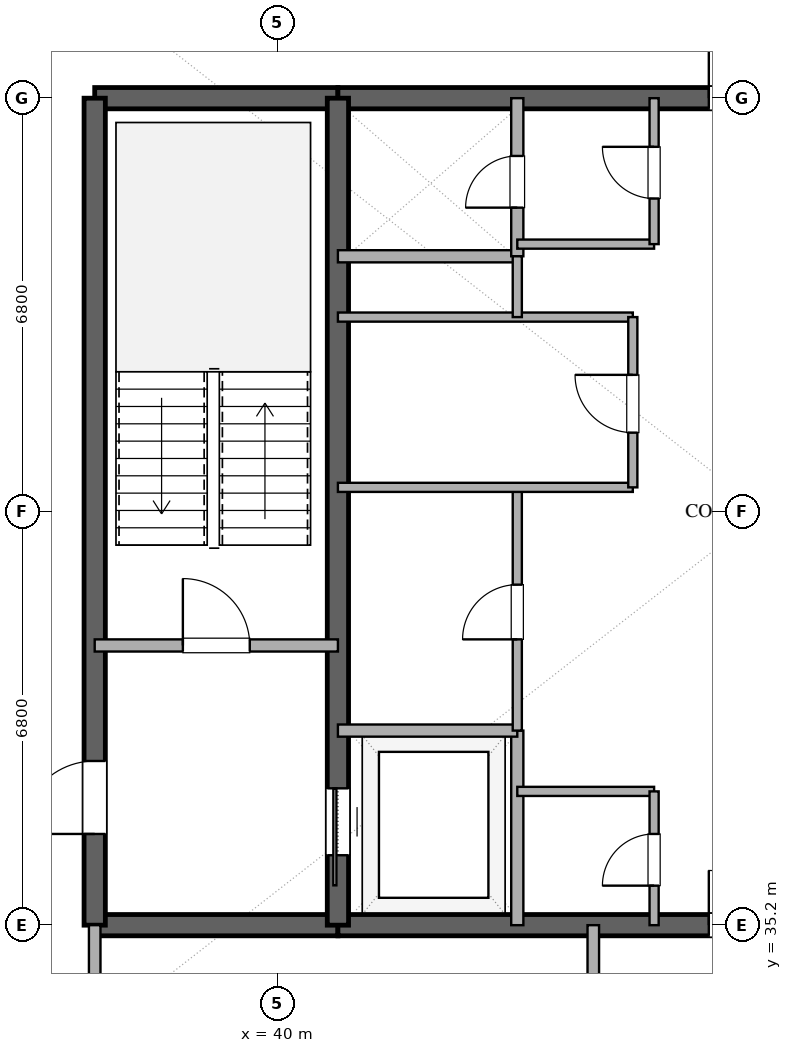
"""IFC4 building model, lengths in metres.
Left out: names, types, materials, properties, quantities, classifications, styles, units other than length and angle.
Written with IfcOpenShell. Run it as: python <this file> out.ifc"""

import sys

from ifc_helpers import new_model, si_unit, direction, frame, frame_2d, origin, place, context, subcontext, project, spatial, rectangle, extrude, element, fill, save


model = new_model("IFC4")
c1 = context("Model", 3, precision=1e-05, world=origin(), true_north=direction((0.0, 1.0)))
c2 = subcontext(c1, "Body", "Model", "MODEL_VIEW")
j1 = project(units=[si_unit("LENGTHUNIT", "METRE"), si_unit("PLANEANGLEUNIT", "RADIAN")], contexts=[c1])
p1 = place(None, origin())
s1 = spatial("IfcSite", under=j1, at=p1, CompositionType="ELEMENT")
p2 = place(p1, origin())
s2 = spatial("IfcBuilding", under=s1, at=p2, CompositionType="ELEMENT")
p3 = place(p2, frame((0.0, 0.0, 312.6)))
s3 = spatial("IfcBuildingStorey", under=s2, at=p3, CompositionType="ELEMENT", Elevation=312.6)
p4 = place(p3, frame((37.0, 35.2, 0.0), z_axis=(0.0, 0.0, 1.0), x_axis=(1.0, 0.0, 0.0)))
e1 = element("IfcWall", 1, at=p4, inside=s3, PredefinedType="SHEAR", context=c2, shape_type="SweptSolid", body=[
    extrude(rectangle(XDim=4.0, YDim=0.35, at=frame_2d((2.0, 0.0))), origin(), (0.0, 0.0, 1.0), 3.64),
])
p5 = place(p3, frame((41.0, 35.2, 0.0), z_axis=(0.0, 0.0, 1.0), x_axis=(1.0, 0.0, 0.0)))
e2 = element("IfcWall", 2, at=p5, inside=s3, PredefinedType="SHEAR", context=c2, shape_type="SweptSolid", body=[
    extrude(rectangle(XDim=14.0, YDim=0.35, at=frame_2d((7.0, 0.0))), origin(), (0.0, 0.0, 1.0), 3.64),
])
p6 = place(p5, frame((6.1, 0.0, 0.0)))
e3 = element("IfcOpeningElement", 3, at=p6, cuts=e2, PredefinedType="OPENING", context=c2, shape_type="SweptSolid", body=[
    extrude(rectangle(XDim=1.8, YDim=2.25, at=frame_2d((0.9, 1.125))), frame((0.0, 0.185, 0.0), z_axis=(0.0, -1.0, 0.0), x_axis=(1.0, 0.0, 0.0)), (0.0, 0.0, 1.0), 0.37),
])
p7 = place(p3, frame((37.0, 48.8, 0.0), z_axis=(0.0, 0.0, 1.0), x_axis=(1.0, 0.0, 0.0)))
e4 = element("IfcWall", 4, at=p7, inside=s3, PredefinedType="SHEAR", context=c2, shape_type="SweptSolid", body=[
    extrude(rectangle(XDim=4.0, YDim=0.35, at=frame_2d((2.0, 0.0))), origin(), (0.0, 0.0, 1.0), 3.64),
])
p8 = place(p3, frame((41.0, 48.8, 0.0), z_axis=(0.0, 0.0, 1.0), x_axis=(1.0, 0.0, 0.0)))
e5 = element("IfcWall", 5, at=p8, inside=s3, PredefinedType="SHEAR", context=c2, shape_type="SweptSolid", body=[
    extrude(rectangle(XDim=14.0, YDim=0.35, at=frame_2d((7.0, 0.0))), origin(), (0.0, 0.0, 1.0), 3.64),
])
p9 = place(p8, frame((6.1, 0.0, 0.0)))
e6 = element("IfcOpeningElement", 6, at=p9, cuts=e5, PredefinedType="OPENING", context=c2, shape_type="SweptSolid", body=[
    extrude(rectangle(XDim=1.8, YDim=2.25, at=frame_2d((0.9, 1.125))), frame((0.0, 0.185, 0.0), z_axis=(0.0, -1.0, 0.0), x_axis=(1.0, 0.0, 0.0)), (0.0, 0.0, 1.0), 0.37),
])
p10 = place(p3, frame((37.0, 35.2, 0.0), z_axis=(0.0, 0.0, 1.0), x_axis=(0.0, 1.0, 0.0)))
e7 = element("IfcWall", 7, at=p10, inside=s3, PredefinedType="SHEAR", context=c2, shape_type="SweptSolid", body=[
    extrude(rectangle(XDim=13.6, YDim=0.35, at=frame_2d((6.8, 0.0))), origin(), (0.0, 0.0, 1.0), 3.64),
])
p11 = place(p10, frame((1.5, 0.0, 0.0)))
e8 = element("IfcOpeningElement", 8, at=p11, cuts=e7, PredefinedType="OPENING", context=c2, shape_type="SweptSolid", body=[
    extrude(rectangle(XDim=1.2, YDim=2.15, at=frame_2d((0.6, 1.075))), frame((0.0, 0.185, 0.0), z_axis=(0.0, -1.0, 0.0), x_axis=(1.0, 0.0, 0.0)), (0.0, 0.0, 1.0), 0.37),
])
p12 = place(p3, frame((41.0, 35.2, 0.0), z_axis=(0.0, 0.0, 1.0), x_axis=(0.0, 1.0, 0.0)))
e9 = element("IfcWall", 9, at=p12, inside=s3, PredefinedType="SHEAR", context=c2, shape_type="SweptSolid", body=[
    extrude(rectangle(XDim=13.6, YDim=0.35, at=frame_2d((6.8, 0.0))), origin(), (0.0, 0.0, 1.0), 3.64),
])
p13 = place(p12, frame((1.15, 0.0, 0.0)))
e10 = element("IfcOpeningElement", 10, at=p13, cuts=e9, PredefinedType="OPENING", context=c2, shape_type="SweptSolid", body=[
    extrude(rectangle(XDim=1.1, YDim=2.2, at=frame_2d((0.55, 1.1))), frame((0.0, 0.185, 0.0), z_axis=(0.0, -1.0, 0.0), x_axis=(1.0, 0.0, 0.0)), (0.0, 0.0, 1.0), 0.37),
])
p14 = place(p3, frame((37.0, 39.8, 0.0), z_axis=(0.0, 0.0, 1.0), x_axis=(1.0, 0.0, 0.0)))
e11 = element("IfcWall", 11, at=p14, inside=s3, PredefinedType="SOLIDWALL", context=c2, shape_type="SweptSolid", body=[
    extrude(rectangle(XDim=4.0, YDim=0.2, at=frame_2d((2.0, 0.0))), origin(), (0.0, 0.0, 1.0), 2.34),
])
p15 = place(p14, frame((1.45, 0.0, 0.0)))
e12 = element("IfcOpeningElement", 12, at=p15, cuts=e11, PredefinedType="OPENING", context=c2, shape_type="SweptSolid", body=[
    extrude(rectangle(XDim=1.1, YDim=2.15, at=frame_2d((0.55, 1.075))), frame((0.0, 0.11, 0.0), z_axis=(0.0, -1.0, 0.0), x_axis=(1.0, 0.0, 0.0)), (0.0, 0.0, 1.0), 0.22),
])
p16 = place(p3, frame((43.95, 35.2, 0.0), z_axis=(0.0, 0.0, 1.0), x_axis=(0.0, 1.0, 0.0)))
e13 = element("IfcWall", 13, at=p16, inside=s3, PredefinedType="SOLIDWALL", context=c2, shape_type="SweptSolid", body=[
    extrude(rectangle(XDim=3.2, YDim=0.2, at=frame_2d((1.6, 0.0))), origin(), (0.0, 0.0, 1.0), 2.34),
])
for number, where, z_axis, x_axis in (
    (14, (41.0, 38.4, 0.0), (0.0, 0.0, 1.0), (1.0, 0.0, 0.0)),
    (15, (41.0, 46.2, 0.0), (0.0, 0.0, 1.0), (1.0, 0.0, 0.0)),
):
    element("IfcWall", number, at=place(p3, frame(where, z_axis=z_axis, x_axis=x_axis)), inside=s3, PredefinedType="SOLIDWALL", context=c2, shape_type="SweptSolid", body=[
        extrude(rectangle(XDim=2.95, YDim=0.2, at=frame_2d((1.475, 0.0))), origin(), (0.0, 0.0, 1.0), 2.34),
    ])
p17 = place(p3, frame((43.95, 46.2, 0.0), z_axis=(0.0, 0.0, 1.0), x_axis=(0.0, 1.0, 0.0)))
e16 = element("IfcWall", 16, at=p17, inside=s3, PredefinedType="SOLIDWALL", context=c2, shape_type="SweptSolid", body=[
    extrude(rectangle(XDim=2.6, YDim=0.2, at=frame_2d((1.3, 0.0))), origin(), (0.0, 0.0, 1.0), 2.34),
])
p18 = place(p17, frame((0.8, 0.0, 0.0)))
e17 = element("IfcOpeningElement", 17, at=p18, cuts=e16, PredefinedType="OPENING", context=c2, shape_type="SweptSolid", body=[
    extrude(rectangle(XDim=0.85, YDim=2.15, at=frame_2d((0.425, 1.075))), frame((0.0, 0.11, 0.0), z_axis=(0.0, -1.0, 0.0), x_axis=(1.0, 0.0, 0.0)), (0.0, 0.0, 1.0), 0.22),
])
p19 = place(p3, frame((43.95, 38.4, 0.0), z_axis=(0.0, 0.0, 1.0), x_axis=(0.0, 1.0, 0.0)))
e18 = element("IfcWall", 18, at=p19, inside=s3, PredefinedType="PARTITIONING", context=c2, shape_type="SweptSolid", body=[
    extrude(rectangle(XDim=4.0, YDim=0.15, at=frame_2d((2.0, 0.0))), origin(), (0.0, 0.0, 1.0), 2.34),
])
p20 = place(p19, frame((1.5, 0.0, 0.0)))
e19 = element("IfcOpeningElement", 19, at=p20, cuts=e18, PredefinedType="OPENING", context=c2, shape_type="SweptSolid", body=[
    extrude(rectangle(XDim=0.9, YDim=2.15, at=frame_2d((0.45, 1.075))), frame((0.0, 0.085, 0.0), z_axis=(0.0, -1.0, 0.0), x_axis=(1.0, 0.0, 0.0)), (0.0, 0.0, 1.0), 0.17),
])
p21 = place(p3, frame((41.0, 42.4, 0.0), z_axis=(0.0, 0.0, 1.0), x_axis=(1.0, 0.0, 0.0)))
e20 = element("IfcWall", 20, at=p21, inside=s3, PredefinedType="PARTITIONING", context=c2, shape_type="SweptSolid", body=[
    extrude(rectangle(XDim=4.85, YDim=0.15, at=frame_2d((2.425, 0.0))), origin(), (0.0, 0.0, 1.0), 2.04),
])
p22 = place(p3, frame((41.0, 45.2, 0.0), z_axis=(0.0, 0.0, 1.0), x_axis=(1.0, 0.0, 0.0)))
e21 = element("IfcWall", 21, at=p22, inside=s3, PredefinedType="PARTITIONING", context=c2, shape_type="SweptSolid", body=[
    extrude(rectangle(XDim=4.85, YDim=0.15, at=frame_2d((2.425, 0.0))), origin(), (0.0, 0.0, 1.0), 2.34),
])
p23 = place(p3, frame((43.95, 45.2, 0.0), z_axis=(0.0, 0.0, 1.0), x_axis=(0.0, 1.0, 0.0)))
e22 = element("IfcWall", 22, at=p23, inside=s3, PredefinedType="PARTITIONING", context=c2, shape_type="SweptSolid", body=[
    extrude(rectangle(XDim=1.0, YDim=0.15, at=frame_2d((0.5, 0.0))), origin(), (0.0, 0.0, 1.0), 2.34),
])
p24 = place(p3, frame((45.85, 42.4, 0.0), z_axis=(0.0, 0.0, 1.0), x_axis=(0.0, 1.0, 0.0)))
e23 = element("IfcWall", 23, at=p24, inside=s3, PredefinedType="PARTITIONING", context=c2, shape_type="SweptSolid", body=[
    extrude(rectangle(XDim=2.8, YDim=0.15, at=frame_2d((1.4, 0.0))), origin(), (0.0, 0.0, 1.0), 2.34),
])
p25 = place(p24, frame((0.9, 0.0, 0.0)))
e24 = element("IfcOpeningElement", 24, at=p25, cuts=e23, PredefinedType="OPENING", context=c2, shape_type="SweptSolid", body=[
    extrude(rectangle(XDim=0.95, YDim=2.15, at=frame_2d((0.475, 1.075))), frame((0.0, 0.085, 0.0), z_axis=(0.0, -1.0, 0.0), x_axis=(1.0, 0.0, 0.0)), (0.0, 0.0, 1.0), 0.17),
])
p26 = place(p3, frame((43.95, 37.4, 0.0), z_axis=(0.0, 0.0, 1.0), x_axis=(1.0, 0.0, 0.0)))
e25 = element("IfcWall", 25, at=p26, inside=s3, PredefinedType="PARTITIONING", context=c2, shape_type="SweptSolid", body=[
    extrude(rectangle(XDim=2.25, YDim=0.15, at=frame_2d((1.125, 0.0))), origin(), (0.0, 0.0, 1.0), 2.34),
])
p27 = place(p3, frame((46.2, 35.2, 0.0), z_axis=(0.0, 0.0, 1.0), x_axis=(0.0, 1.0, 0.0)))
e26 = element("IfcWall", 26, at=p27, inside=s3, PredefinedType="PARTITIONING", context=c2, shape_type="SweptSolid", body=[
    extrude(rectangle(XDim=2.2, YDim=0.15, at=frame_2d((1.1, 0.0))), origin(), (0.0, 0.0, 1.0), 2.34),
])
p28 = place(p27, frame((0.65, 0.0, 0.0)))
e27 = element("IfcOpeningElement", 27, at=p28, cuts=e26, PredefinedType="OPENING", context=c2, shape_type="SweptSolid", body=[
    extrude(rectangle(XDim=0.85, YDim=2.15, at=frame_2d((0.425, 1.075))), frame((0.0, 0.085, 0.0), z_axis=(0.0, -1.0, 0.0), x_axis=(1.0, 0.0, 0.0)), (0.0, 0.0, 1.0), 0.17),
])
p29 = place(p3, frame((43.95, 46.4, 0.0), z_axis=(0.0, 0.0, 1.0), x_axis=(1.0, 0.0, 0.0)))
e28 = element("IfcWall", 28, at=p29, inside=s3, PredefinedType="PARTITIONING", context=c2, shape_type="SweptSolid", body=[
    extrude(rectangle(XDim=2.25, YDim=0.15, at=frame_2d((1.125, 0.0))), origin(), (0.0, 0.0, 1.0), 2.34),
])
p30 = place(p3, frame((46.2, 46.4, 0.0), z_axis=(0.0, 0.0, 1.0), x_axis=(0.0, 1.0, 0.0)))
e29 = element("IfcWall", 29, at=p30, inside=s3, PredefinedType="PARTITIONING", context=c2, shape_type="SweptSolid", body=[
    extrude(rectangle(XDim=2.4, YDim=0.15, at=frame_2d((1.2, 0.0))), origin(), (0.0, 0.0, 1.0), 2.34),
])
p31 = place(p30, frame((0.75, 0.0, 0.0)))
e30 = element("IfcOpeningElement", 30, at=p31, cuts=e29, PredefinedType="OPENING", context=c2, shape_type="SweptSolid", body=[
    extrude(rectangle(XDim=0.85, YDim=2.15, at=frame_2d((0.425, 1.075))), frame((0.0, 0.085, 0.0), z_axis=(0.0, -1.0, 0.0), x_axis=(1.0, 0.0, 0.0)), (0.0, 0.0, 1.0), 0.17),
])
p32 = place(p3, frame((45.2, 33.1, 0.0), z_axis=(0.0, 0.0, 1.0), x_axis=(0.0, 1.0, 0.0)))
e31 = element("IfcWall", 31, at=p32, inside=s3, PredefinedType="PARTITIONING", context=c2, shape_type="SweptSolid", body=[
    extrude(rectangle(XDim=2.1, YDim=0.19, at=frame_2d((1.05, 0.0))), origin(), (0.0, 0.0, 1.0), 2.34),
])
p33 = place(p3, frame((37.0, 34.0, 0.0), z_axis=(0.0, 0.0, 1.0), x_axis=(0.0, 1.0, 0.0)))
e32 = element("IfcWall", 32, at=p33, inside=s3, PredefinedType="PARTITIONING", context=c2, shape_type="SweptSolid", body=[
    extrude(rectangle(XDim=1.2, YDim=0.19, at=frame_2d((0.6, 0.0))), origin(), (0.0, 0.0, 1.0), 2.34),
])
p34 = place(p13, origin())
e33 = element("IfcDoor", 33, at=p34, inside=s3, OperationType="SLIDING_TO_LEFT", PredefinedType="DOOR", context=c2, shape_type="SweptSolid", body=[
    extrude(rectangle(XDim=1.1, YDim=2.2, at=frame_2d((0.55, 1.1))), frame((0.0, 0.025, 0.0), z_axis=(0.0, -1.0, 0.0), x_axis=(1.0, 0.0, 0.0)), (0.0, 0.0, 1.0), 0.05),
])
fill(e10, e33)
p35 = place(p11, origin())
e34 = element("IfcDoor", 34, at=p35, inside=s3, OperationType="SINGLE_SWING_LEFT", PredefinedType="DOOR", context=c2, shape_type="SweptSolid", body=[
    extrude(rectangle(XDim=1.2, YDim=2.15, at=frame_2d((0.6, 1.075))), frame((0.0, 0.025, 0.0), z_axis=(0.0, -1.0, 0.0), x_axis=(1.0, 0.0, 0.0)), (0.0, 0.0, 1.0), 0.05),
])
fill(e8, e34)
p36 = place(p6, origin())
e35 = element("IfcDoor", 35, at=p36, inside=s3, OperationType="DOUBLE_DOOR_SINGLE_SWING", PredefinedType="DOOR", context=c2, shape_type="SweptSolid", body=[
    extrude(rectangle(XDim=1.8, YDim=2.25, at=frame_2d((0.9, 1.125))), frame((0.0, 0.025, 0.0), z_axis=(0.0, -1.0, 0.0), x_axis=(1.0, 0.0, 0.0)), (0.0, 0.0, 1.0), 0.05),
])
fill(e3, e35)
p37 = place(p9, origin())
e36 = element("IfcDoor", 36, at=p37, inside=s3, OperationType="DOUBLE_DOOR_SINGLE_SWING", PredefinedType="DOOR", context=c2, shape_type="SweptSolid", body=[
    extrude(rectangle(XDim=1.8, YDim=2.25, at=frame_2d((0.9, 1.125))), frame((0.0, 0.025, 0.0), z_axis=(0.0, -1.0, 0.0), x_axis=(1.0, 0.0, 0.0)), (0.0, 0.0, 1.0), 0.05),
])
fill(e6, e36)
p38 = place(p15, origin())
e37 = element("IfcDoor", 37, at=p38, inside=s3, OperationType="SINGLE_SWING_LEFT", PredefinedType="DOOR", context=c2, shape_type="SweptSolid", body=[
    extrude(rectangle(XDim=1.1, YDim=2.15, at=frame_2d((0.55, 1.075))), frame((0.0, 0.025, 0.0), z_axis=(0.0, -1.0, 0.0), x_axis=(1.0, 0.0, 0.0)), (0.0, 0.0, 1.0), 0.05),
])
fill(e12, e37)
p39 = place(p18, origin())
e38 = element("IfcDoor", 38, at=p39, inside=s3, OperationType="SINGLE_SWING_LEFT", PredefinedType="DOOR", context=c2, shape_type="SweptSolid", body=[
    extrude(rectangle(XDim=0.85, YDim=2.15, at=frame_2d((0.425, 1.075))), frame((0.0, 0.025, 0.0), z_axis=(0.0, -1.0, 0.0), x_axis=(1.0, 0.0, 0.0)), (0.0, 0.0, 1.0), 0.05),
])
fill(e17, e38)
p40 = place(p20, origin())
e39 = element("IfcDoor", 39, at=p40, inside=s3, OperationType="SINGLE_SWING_LEFT", PredefinedType="DOOR", context=c2, shape_type="SweptSolid", body=[
    extrude(rectangle(XDim=0.9, YDim=2.15, at=frame_2d((0.45, 1.075))), frame((0.0, 0.025, 0.0), z_axis=(0.0, -1.0, 0.0), x_axis=(1.0, 0.0, 0.0)), (0.0, 0.0, 1.0), 0.05),
])
fill(e19, e39)
p41 = place(p25, origin())
e40 = element("IfcDoor", 40, at=p41, inside=s3, OperationType="SINGLE_SWING_RIGHT", PredefinedType="DOOR", context=c2, shape_type="SweptSolid", body=[
    extrude(rectangle(XDim=0.95, YDim=2.15, at=frame_2d((0.475, 1.075))), frame((0.0, 0.025, 0.0), z_axis=(0.0, -1.0, 0.0), x_axis=(1.0, 0.0, 0.0)), (0.0, 0.0, 1.0), 0.05),
])
fill(e24, e40)
p42 = place(p28, origin())
e41 = element("IfcDoor", 41, at=p42, inside=s3, OperationType="SINGLE_SWING_LEFT", PredefinedType="DOOR", context=c2, shape_type="SweptSolid", body=[
    extrude(rectangle(XDim=0.85, YDim=2.15, at=frame_2d((0.425, 1.075))), frame((0.0, 0.025, 0.0), z_axis=(0.0, -1.0, 0.0), x_axis=(1.0, 0.0, 0.0)), (0.0, 0.0, 1.0), 0.05),
])
fill(e27, e41)
p43 = place(p31, origin())
e42 = element("IfcDoor", 42, at=p43, inside=s3, OperationType="SINGLE_SWING_RIGHT", PredefinedType="DOOR", context=c2, shape_type="SweptSolid", body=[
    extrude(rectangle(XDim=0.85, YDim=2.15, at=frame_2d((0.425, 1.075))), frame((0.0, 0.025, 0.0), z_axis=(0.0, -1.0, 0.0), x_axis=(1.0, 0.0, 0.0)), (0.0, 0.0, 1.0), 0.05),
])
fill(e30, e42)
save(model, sys.argv[1])
